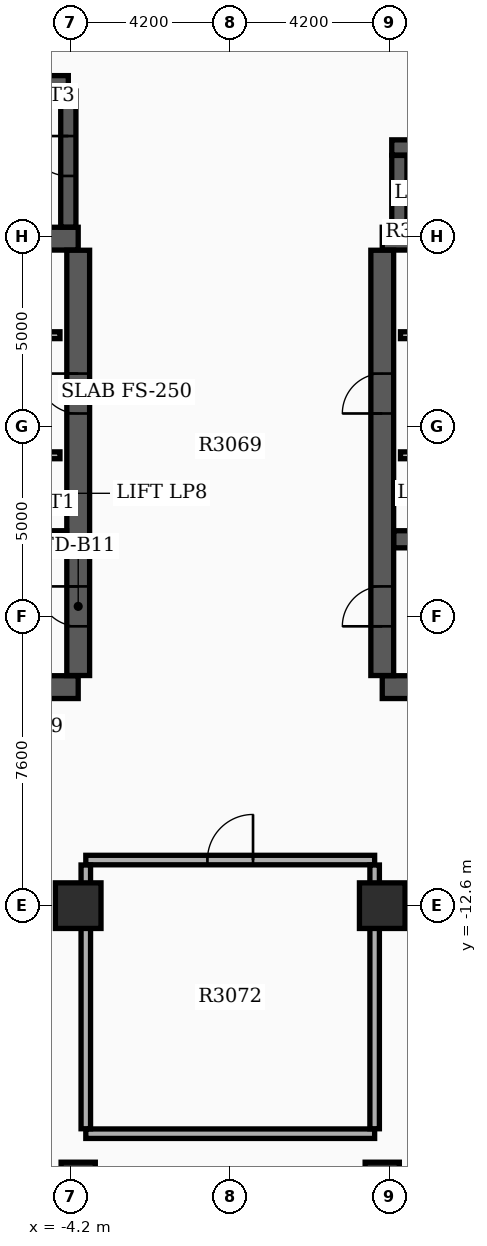
"""IFC4 building model, lengths in metres.
Left out: names, types, materials, properties, quantities, classifications, styles, units other than length and angle.
Written with IfcOpenShell. Run it as: python <this file> out.ifc"""

import sys

from ifc_helpers import new_model, si_unit, direction, frame, frame_2d, origin, origin_2d, place, context, subcontext, project, spatial, rectangle, extrude, element, fill, save


model = new_model("IFC4")
c1 = context("Model", 3, precision=1e-05, world=origin(), true_north=direction((0.0, 1.0)))
c2 = subcontext(c1, "Body", "Model", "MODEL_VIEW")
j1 = project(units=[si_unit("LENGTHUNIT", "METRE"), si_unit("PLANEANGLEUNIT", "RADIAN")], contexts=[c1])
p1 = place(None, origin())
s1 = spatial("IfcSite", under=j1, at=p1, CompositionType="ELEMENT")
p2 = place(p1, origin())
s2 = spatial("IfcBuilding", under=s1, at=p2, CompositionType="ELEMENT")
p3 = place(p2, frame((0.0, 0.0, 191.7)))
s3 = spatial("IfcBuildingStorey", under=s2, at=p3, CompositionType="ELEMENT", Elevation=191.7)
for number, where, z_axis, x_axis in (
    (1, (-12.4, -6.85, 0.0), (0.0, 0.0, 1.0), (1.0, 0.0, 0.0)),
    (2, (-12.4, 4.95, 0.0), (0.0, 0.0, 1.0), (1.0, 0.0, 0.0)),
):
    element("IfcWall", number, at=place(p3, frame(where, z_axis=z_axis, x_axis=x_axis)), inside=s3, PredefinedType="SHEAR", context=c2, shape_type="SweptSolid", body=[
        extrude(rectangle(XDim=8.4, YDim=0.6, at=frame_2d((4.2, 0.0))), origin(), (0.0, 0.0, 1.0), 4.85),
    ])
p4 = place(p3, frame((-4.0, -6.545, 0.0), z_axis=(0.0, 0.0, 1.0), x_axis=(0.0, 1.0, 0.0)))
e3 = element("IfcWall", 3, at=p4, inside=s3, PredefinedType="SHEAR", context=c2, shape_type="SweptSolid", body=[
    extrude(rectangle(XDim=11.19, YDim=0.6, at=frame_2d((5.595, 0.0))), origin(), (0.0, 0.0, 1.0), 4.85),
])
p5 = place(p4, frame((1.295, 0.0, 0.0)))
e4 = element("IfcOpeningElement", 4, at=p5, cuts=e3, PredefinedType="OPENING", context=c2, shape_type="SweptSolid", body=[
    extrude(rectangle(XDim=1.05, YDim=2.15, at=frame_2d((0.525, 1.075))), frame((0.0, 0.31, 0.0), z_axis=(0.0, -1.0, 0.0), x_axis=(1.0, 0.0, 0.0)), (0.0, 0.0, 1.0), 0.62),
])
p6 = place(p4, frame((6.895, 0.0, 0.0)))
e5 = element("IfcOpeningElement", 5, at=p6, cuts=e3, PredefinedType="OPENING", context=c2, shape_type="SweptSolid", body=[
    extrude(rectangle(XDim=1.05, YDim=2.15, at=frame_2d((0.525, 1.075))), frame((0.0, 0.31, 0.0), z_axis=(0.0, -1.0, 0.0), x_axis=(1.0, 0.0, 0.0)), (0.0, 0.0, 1.0), 0.62),
])
p7 = place(p3, frame((-12.095, -2.96, 0.0), z_axis=(0.0, 0.0, 1.0), x_axis=(1.0, 0.0, 0.0)))
e6 = element("IfcWall", 6, at=p7, inside=s3, PredefinedType="SHEAR", context=c2, shape_type="SweptSolid", body=[
    extrude(rectangle(XDim=7.79, YDim=0.45, at=frame_2d((3.895, 0.0))), origin(), (0.0, 0.0, 1.0), 4.85),
])
for number, where, z_axis, x_axis in (
    (7, (4.0, -6.85, 0.0), (0.0, 0.0, 1.0), (1.0, 0.0, 0.0)),
    (8, (4.0, 4.95, 0.0), (0.0, 0.0, 1.0), (1.0, 0.0, 0.0)),
):
    element("IfcWall", number, at=place(p3, frame(where, z_axis=z_axis, x_axis=x_axis)), inside=s3, PredefinedType="SHEAR", context=c2, shape_type="SweptSolid", body=[
        extrude(rectangle(XDim=8.4, YDim=0.6, at=frame_2d((4.2, 0.0))), origin(), (0.0, 0.0, 1.0), 4.85),
    ])
p8 = place(p3, frame((4.0, -6.545, 0.0), z_axis=(0.0, 0.0, 1.0), x_axis=(0.0, 1.0, 0.0)))
e9 = element("IfcWall", 9, at=p8, inside=s3, PredefinedType="SHEAR", context=c2, shape_type="SweptSolid", body=[
    extrude(rectangle(XDim=11.19, YDim=0.6, at=frame_2d((5.595, 0.0))), origin(), (0.0, 0.0, 1.0), 4.85),
])
p9 = place(p8, frame((1.295, 0.0, 0.0)))
e10 = element("IfcOpeningElement", 10, at=p9, cuts=e9, PredefinedType="OPENING", context=c2, shape_type="SweptSolid", body=[
    extrude(rectangle(XDim=1.05, YDim=2.15, at=frame_2d((0.525, 1.075))), frame((0.0, 0.31, 0.0), z_axis=(0.0, -1.0, 0.0), x_axis=(1.0, 0.0, 0.0)), (0.0, 0.0, 1.0), 0.62),
])
p10 = place(p8, frame((6.895, 0.0, 0.0)))
e11 = element("IfcOpeningElement", 11, at=p10, cuts=e9, PredefinedType="OPENING", context=c2, shape_type="SweptSolid", body=[
    extrude(rectangle(XDim=1.05, YDim=2.15, at=frame_2d((0.525, 1.075))), frame((0.0, 0.31, 0.0), z_axis=(0.0, -1.0, 0.0), x_axis=(1.0, 0.0, 0.0)), (0.0, 0.0, 1.0), 0.62),
])
p11 = place(p3, frame((4.305, -2.96, 0.0), z_axis=(0.0, 0.0, 1.0), x_axis=(1.0, 0.0, 0.0)))
e12 = element("IfcWall", 12, at=p11, inside=s3, PredefinedType="SHEAR", context=c2, shape_type="SweptSolid", body=[
    extrude(rectangle(XDim=7.79, YDim=0.45, at=frame_2d((3.895, 0.0))), origin(), (0.0, 0.0, 1.0), 4.85),
])
p12 = place(p3, frame((-12.22, 9.04, 0.0), z_axis=(0.0, 0.0, 1.0), x_axis=(1.0, 0.0, 0.0)))
e13 = element("IfcWall", 13, at=p12, inside=s3, PredefinedType="SHEAR", context=c2, shape_type="SweptSolid", body=[
    extrude(rectangle(XDim=7.96, YDim=0.4, at=frame_2d((3.98, 0.0))), origin(), (0.0, 0.0, 1.0), 4.85),
])
p13 = place(p3, frame((-4.26, 5.255, 0.0), z_axis=(0.0, 0.0, 1.0), x_axis=(0.0, 1.0, 0.0)))
e14 = element("IfcWall", 14, at=p13, inside=s3, PredefinedType="SHEAR", context=c2, shape_type="SweptSolid", body=[
    extrude(rectangle(XDim=3.58, YDim=0.4, at=frame_2d((1.79, 0.0))), origin(), (0.0, 0.0, 1.0), 4.85),
])
p14 = place(p13, frame((1.345, 0.0, 0.0)))
e15 = element("IfcOpeningElement", 15, at=p14, cuts=e14, PredefinedType="OPENING", context=c2, shape_type="SweptSolid", body=[
    extrude(rectangle(XDim=1.05, YDim=2.15, at=frame_2d((0.525, 1.075))), frame((0.0, 0.21, 0.0), z_axis=(0.0, -1.0, 0.0), x_axis=(1.0, 0.0, 0.0)), (0.0, 0.0, 1.0), 0.42),
])
p15 = place(p3, frame((4.45, 5.255, 0.0), z_axis=(0.0, 0.0, 1.0), x_axis=(0.0, 1.0, 0.0)))
e16 = element("IfcWall", 16, at=p15, inside=s3, PredefinedType="SHEAR", context=c2, shape_type="SweptSolid", body=[
    extrude(rectangle(XDim=1.885, YDim=0.4, at=frame_2d((0.942, 0.0))), origin(), (0.0, 0.0, 1.0), 4.85),
])
p16 = place(p3, frame((4.25, 7.35, 0.0), z_axis=(0.0, 0.0, 1.0), x_axis=(1.0, 0.0, 0.0)))
e17 = element("IfcWall", 17, at=p16, inside=s3, PredefinedType="SHEAR", context=c2, shape_type="SweptSolid", body=[
    extrude(rectangle(XDim=5.4, YDim=0.4, at=frame_2d((2.7, 0.0))), origin(), (0.0, 0.0, 1.0), 4.85),
])
p17 = place(p16, frame((0.85, 0.0, 0.0)))
e18 = element("IfcOpeningElement", 18, at=p17, cuts=e17, PredefinedType="OPENING", context=c2, shape_type="SweptSolid", body=[
    extrude(rectangle(XDim=1.2, YDim=2.2, at=frame_2d((0.6, 1.1))), frame((0.0, 0.21, 0.0), z_axis=(0.0, -1.0, 0.0), x_axis=(1.0, 0.0, 0.0)), (0.0, 0.0, 1.0), 0.42),
])
p18 = place(p16, frame((3.25, 0.0, 0.0)))
e19 = element("IfcOpeningElement", 19, at=p18, cuts=e17, PredefinedType="OPENING", context=c2, shape_type="SweptSolid", body=[
    extrude(rectangle(XDim=1.2, YDim=2.2, at=frame_2d((0.6, 1.1))), frame((0.0, 0.21, 0.0), z_axis=(0.0, -1.0, 0.0), x_axis=(1.0, 0.0, 0.0)), (0.0, 0.0, 1.0), 0.42),
])
for number, where, z_axis, x_axis in (
    (20, (-4.0, -12.6, 0.0), (0.0, 0.0, 1.0), (1.0, 0.0, 0.0)),
    (21, (4.0, -12.6, 0.0), (0.0, 0.0, 1.0), (1.0, 0.0, 0.0)),
):
    element("IfcColumn", number, at=place(p3, frame(where, z_axis=z_axis, x_axis=x_axis)), inside=s3, PredefinedType="COLUMN", context=c2, shape_type="SweptSolid", body=[
        extrude(rectangle(XDim=1.2, YDim=1.2, at=origin_2d()), origin(), (0.0, 0.0, 1.0), 5.1),
    ])
for number, where, z_axis, x_axis in (
    (22, (-4.0, -19.8, 0.0), (0.0, 0.0, 1.0), (1.0, 0.0, 0.0)),
    (23, (4.0, -19.8, 0.0), (0.0, 0.0, 1.0), (1.0, 0.0, 0.0)),
):
    element("IfcColumn", number, at=place(p3, frame(where, z_axis=z_axis, x_axis=x_axis)), inside=s3, PredefinedType="COLUMN", context=c2, shape_type="SweptSolid", body=[
        extrude(rectangle(XDim=0.9, YDim=0.9, at=origin_2d()), origin(), (0.0, 0.0, 1.0), 5.1),
    ])
p19 = place(p3, frame((-11.9, 2.41, 0.0), z_axis=(0.0, 0.0, 1.0), x_axis=(1.0, 0.0, 0.0)))
e24 = element("IfcWall", 24, at=p19, inside=s3, PredefinedType="SOLIDWALL", context=c2, shape_type="SweptSolid", body=[
    extrude(rectangle(XDim=7.42, YDim=0.18, at=frame_2d((3.71, 0.0))), origin(), (0.0, 0.0, 1.0), 3.92),
])
p20 = place(p19, frame((0.55, 0.0, 0.0)))
e25 = element("IfcOpeningElement", 25, at=p20, cuts=e24, PredefinedType="OPENING", context=c2, shape_type="SweptSolid", body=[
    extrude(rectangle(XDim=1.1, YDim=2.15, at=frame_2d((0.55, 1.075))), frame((0.0, 0.1, 0.0), z_axis=(0.0, -1.0, 0.0), x_axis=(1.0, 0.0, 0.0)), (0.0, 0.0, 1.0), 0.2),
])
p21 = place(p19, frame((4.9, 0.0, 0.0)))
e26 = element("IfcOpeningElement", 26, at=p21, cuts=e24, PredefinedType="OPENING", context=c2, shape_type="SweptSolid", body=[
    extrude(rectangle(XDim=0.88, YDim=2.1, at=frame_2d((0.44, 1.05))), frame((0.0, 0.1, 0.0), z_axis=(0.0, -1.0, 0.0), x_axis=(1.0, 0.0, 0.0)), (0.0, 0.0, 1.0), 0.2),
])
p22 = place(p3, frame((4.48, 2.41, 0.0), z_axis=(0.0, 0.0, 1.0), x_axis=(1.0, 0.0, 0.0)))
e27 = element("IfcWall", 27, at=p22, inside=s3, PredefinedType="SOLIDWALL", context=c2, shape_type="SweptSolid", body=[
    extrude(rectangle(XDim=7.42, YDim=0.18, at=frame_2d((3.71, 0.0))), origin(), (0.0, 0.0, 1.0), 3.92),
])
p23 = place(p22, frame((5.67, 0.0, 0.0)))
e28 = element("IfcOpeningElement", 28, at=p23, cuts=e27, PredefinedType="OPENING", context=c2, shape_type="SweptSolid", body=[
    extrude(rectangle(XDim=1.1, YDim=2.15, at=frame_2d((0.55, 1.075))), frame((0.0, 0.1, 0.0), z_axis=(0.0, -1.0, 0.0), x_axis=(1.0, 0.0, 0.0)), (0.0, 0.0, 1.0), 0.2),
])
p24 = place(p22, frame((1.6, 0.0, 0.0)))
e29 = element("IfcOpeningElement", 29, at=p24, cuts=e27, PredefinedType="OPENING", context=c2, shape_type="SweptSolid", body=[
    extrude(rectangle(XDim=0.88, YDim=2.1, at=frame_2d((0.44, 1.05))), frame((0.0, 0.1, 0.0), z_axis=(0.0, -1.0, 0.0), x_axis=(1.0, 0.0, 0.0)), (0.0, 0.0, 1.0), 0.2),
])
p25 = place(p3, frame((-11.9, -0.75, 0.0), z_axis=(0.0, 0.0, 1.0), x_axis=(1.0, 0.0, 0.0)))
e30 = element("IfcWall", 30, at=p25, inside=s3, PredefinedType="SOLIDWALL", context=c2, shape_type="SweptSolid", body=[
    extrude(rectangle(XDim=7.42, YDim=0.18, at=frame_2d((3.71, 0.0))), origin(), (0.0, 0.0, 1.0), 3.92),
])
p26 = place(p25, frame((0.45, 0.0, 0.0)))
e31 = element("IfcOpeningElement", 31, at=p26, cuts=e30, PredefinedType="OPENING", context=c2, shape_type="SweptSolid", body=[
    extrude(rectangle(XDim=1.1, YDim=2.15, at=frame_2d((0.55, 1.075))), frame((0.0, 0.1, 0.0), z_axis=(0.0, -1.0, 0.0), x_axis=(1.0, 0.0, 0.0)), (0.0, 0.0, 1.0), 0.2),
])
p27 = place(p25, frame((2.35, 0.0, 0.0)))
e32 = element("IfcOpeningElement", 32, at=p27, cuts=e30, PredefinedType="OPENING", context=c2, shape_type="SweptSolid", body=[
    extrude(rectangle(XDim=1.1, YDim=2.15, at=frame_2d((0.55, 1.075))), frame((0.0, 0.1, 0.0), z_axis=(0.0, -1.0, 0.0), x_axis=(1.0, 0.0, 0.0)), (0.0, 0.0, 1.0), 0.2),
])
p28 = place(p25, frame((5.75, 0.0, 0.0)))
e33 = element("IfcOpeningElement", 33, at=p28, cuts=e30, PredefinedType="OPENING", context=c2, shape_type="SweptSolid", body=[
    extrude(rectangle(XDim=1.1, YDim=2.15, at=frame_2d((0.55, 1.075))), frame((0.0, 0.1, 0.0), z_axis=(0.0, -1.0, 0.0), x_axis=(1.0, 0.0, 0.0)), (0.0, 0.0, 1.0), 0.2),
])
p29 = place(p3, frame((4.48, -0.75, 0.0), z_axis=(0.0, 0.0, 1.0), x_axis=(1.0, 0.0, 0.0)))
e34 = element("IfcWall", 34, at=p29, inside=s3, PredefinedType="SOLIDWALL", context=c2, shape_type="SweptSolid", body=[
    extrude(rectangle(XDim=7.42, YDim=0.18, at=frame_2d((3.71, 0.0))), origin(), (0.0, 0.0, 1.0), 3.92),
])
p30 = place(p29, frame((0.52, 0.0, 0.0)))
e35 = element("IfcOpeningElement", 35, at=p30, cuts=e34, PredefinedType="OPENING", context=c2, shape_type="SweptSolid", body=[
    extrude(rectangle(XDim=1.1, YDim=2.15, at=frame_2d((0.55, 1.075))), frame((0.0, 0.1, 0.0), z_axis=(0.0, -1.0, 0.0), x_axis=(1.0, 0.0, 0.0)), (0.0, 0.0, 1.0), 0.2),
])
p31 = place(p29, frame((3.92, 0.0, 0.0)))
e36 = element("IfcOpeningElement", 36, at=p31, cuts=e34, PredefinedType="OPENING", context=c2, shape_type="SweptSolid", body=[
    extrude(rectangle(XDim=1.1, YDim=2.15, at=frame_2d((0.55, 1.075))), frame((0.0, 0.1, 0.0), z_axis=(0.0, -1.0, 0.0), x_axis=(1.0, 0.0, 0.0)), (0.0, 0.0, 1.0), 0.2),
])
p32 = place(p29, frame((5.82, 0.0, 0.0)))
e37 = element("IfcOpeningElement", 37, at=p32, cuts=e34, PredefinedType="OPENING", context=c2, shape_type="SweptSolid", body=[
    extrude(rectangle(XDim=1.1, YDim=2.15, at=frame_2d((0.55, 1.075))), frame((0.0, 0.1, 0.0), z_axis=(0.0, -1.0, 0.0), x_axis=(1.0, 0.0, 0.0)), (0.0, 0.0, 1.0), 0.2),
])
p33 = place(p3, frame((-3.8, -18.6, 0.0), z_axis=(0.0, 0.0, 1.0), x_axis=(1.0, 0.0, 0.0)))
e38 = element("IfcWall", 38, at=p33, inside=s3, PredefinedType="SOLIDWALL", context=c2, shape_type="SweptSolid", body=[
    extrude(rectangle(XDim=7.6, YDim=0.25, at=frame_2d((3.8, 0.0))), origin(), (0.0, 0.0, 1.0), 3.92),
])
p34 = place(p3, frame((-3.8, -11.4, 0.0), z_axis=(0.0, 0.0, 1.0), x_axis=(1.0, 0.0, 0.0)))
e39 = element("IfcWall", 39, at=p34, inside=s3, PredefinedType="SOLIDWALL", context=c2, shape_type="SweptSolid", body=[
    extrude(rectangle(XDim=7.6, YDim=0.25, at=frame_2d((3.8, 0.0))), origin(), (0.0, 0.0, 1.0), 3.92),
])
p35 = place(p34, frame((3.2, 0.0, 0.0)))
e40 = element("IfcOpeningElement", 40, at=p35, cuts=e39, PredefinedType="OPENING", context=c2, shape_type="SweptSolid", body=[
    extrude(rectangle(XDim=1.2, YDim=2.15, at=frame_2d((0.6, 1.075))), frame((0.0, 0.135, 0.0), z_axis=(0.0, -1.0, 0.0), x_axis=(1.0, 0.0, 0.0)), (0.0, 0.0, 1.0), 0.27),
])
for number, where, z_axis, x_axis in (
    (41, (-3.8, -18.47, 0.0), (0.0, 0.0, 1.0), (0.0, 1.0, 0.0)),
    (42, (3.8, -18.47, 0.0), (0.0, 0.0, 1.0), (0.0, 1.0, 0.0)),
):
    element("IfcWall", number, at=place(p3, frame(where, z_axis=z_axis, x_axis=x_axis)), inside=s3, PredefinedType="SOLIDWALL", context=c2, shape_type="SweptSolid", body=[
        extrude(rectangle(XDim=6.94, YDim=0.25, at=frame_2d((3.47, 0.0))), origin(), (0.0, 0.0, 1.0), 3.92),
    ])
p36 = place(p5, origin())
e43 = element("IfcDoor", 43, at=p36, inside=s3, OperationType="SINGLE_SWING_RIGHT", PredefinedType="DOOR", context=c2, shape_type="SweptSolid", body=[
    extrude(rectangle(XDim=1.05, YDim=2.15, at=frame_2d((0.525, 1.075))), frame((0.0, 0.025, 0.0), z_axis=(0.0, -1.0, 0.0), x_axis=(1.0, 0.0, 0.0)), (0.0, 0.0, 1.0), 0.05),
])
fill(e4, e43)
p37 = place(p9, origin())
e44 = element("IfcDoor", 44, at=p37, inside=s3, OperationType="SINGLE_SWING_LEFT", PredefinedType="DOOR", context=c2, shape_type="SweptSolid", body=[
    extrude(rectangle(XDim=1.05, YDim=2.15, at=frame_2d((0.525, 1.075))), frame((0.0, 0.025, 0.0), z_axis=(0.0, -1.0, 0.0), x_axis=(1.0, 0.0, 0.0)), (0.0, 0.0, 1.0), 0.05),
])
fill(e10, e44)
p38 = place(p6, origin())
e45 = element("IfcDoor", 45, at=p38, inside=s3, OperationType="SINGLE_SWING_RIGHT", PredefinedType="DOOR", context=c2, shape_type="SweptSolid", body=[
    extrude(rectangle(XDim=1.05, YDim=2.15, at=frame_2d((0.525, 1.075))), frame((0.0, 0.025, 0.0), z_axis=(0.0, -1.0, 0.0), x_axis=(1.0, 0.0, 0.0)), (0.0, 0.0, 1.0), 0.05),
])
fill(e5, e45)
p39 = place(p10, origin())
e46 = element("IfcDoor", 46, at=p39, inside=s3, OperationType="SINGLE_SWING_LEFT", PredefinedType="DOOR", context=c2, shape_type="SweptSolid", body=[
    extrude(rectangle(XDim=1.05, YDim=2.15, at=frame_2d((0.525, 1.075))), frame((0.0, 0.025, 0.0), z_axis=(0.0, -1.0, 0.0), x_axis=(1.0, 0.0, 0.0)), (0.0, 0.0, 1.0), 0.05),
])
fill(e11, e46)
p40 = place(p14, origin())
e47 = element("IfcDoor", 47, at=p40, inside=s3, OperationType="SINGLE_SWING_RIGHT", PredefinedType="DOOR", context=c2, shape_type="SweptSolid", body=[
    extrude(rectangle(XDim=1.05, YDim=2.15, at=frame_2d((0.525, 1.075))), frame((0.0, 0.025, 0.0), z_axis=(0.0, -1.0, 0.0), x_axis=(1.0, 0.0, 0.0)), (0.0, 0.0, 1.0), 0.05),
])
fill(e15, e47)
p41 = place(p35, origin())
e48 = element("IfcDoor", 48, at=p41, inside=s3, OperationType="SINGLE_SWING_RIGHT", PredefinedType="DOOR", context=c2, shape_type="SweptSolid", body=[
    extrude(rectangle(XDim=1.2, YDim=2.15, at=frame_2d((0.6, 1.075))), frame((0.0, 0.025, 0.0), z_axis=(0.0, -1.0, 0.0), x_axis=(1.0, 0.0, 0.0)), (0.0, 0.0, 1.0), 0.05),
])
fill(e40, e48)
save(model, sys.argv[1])
